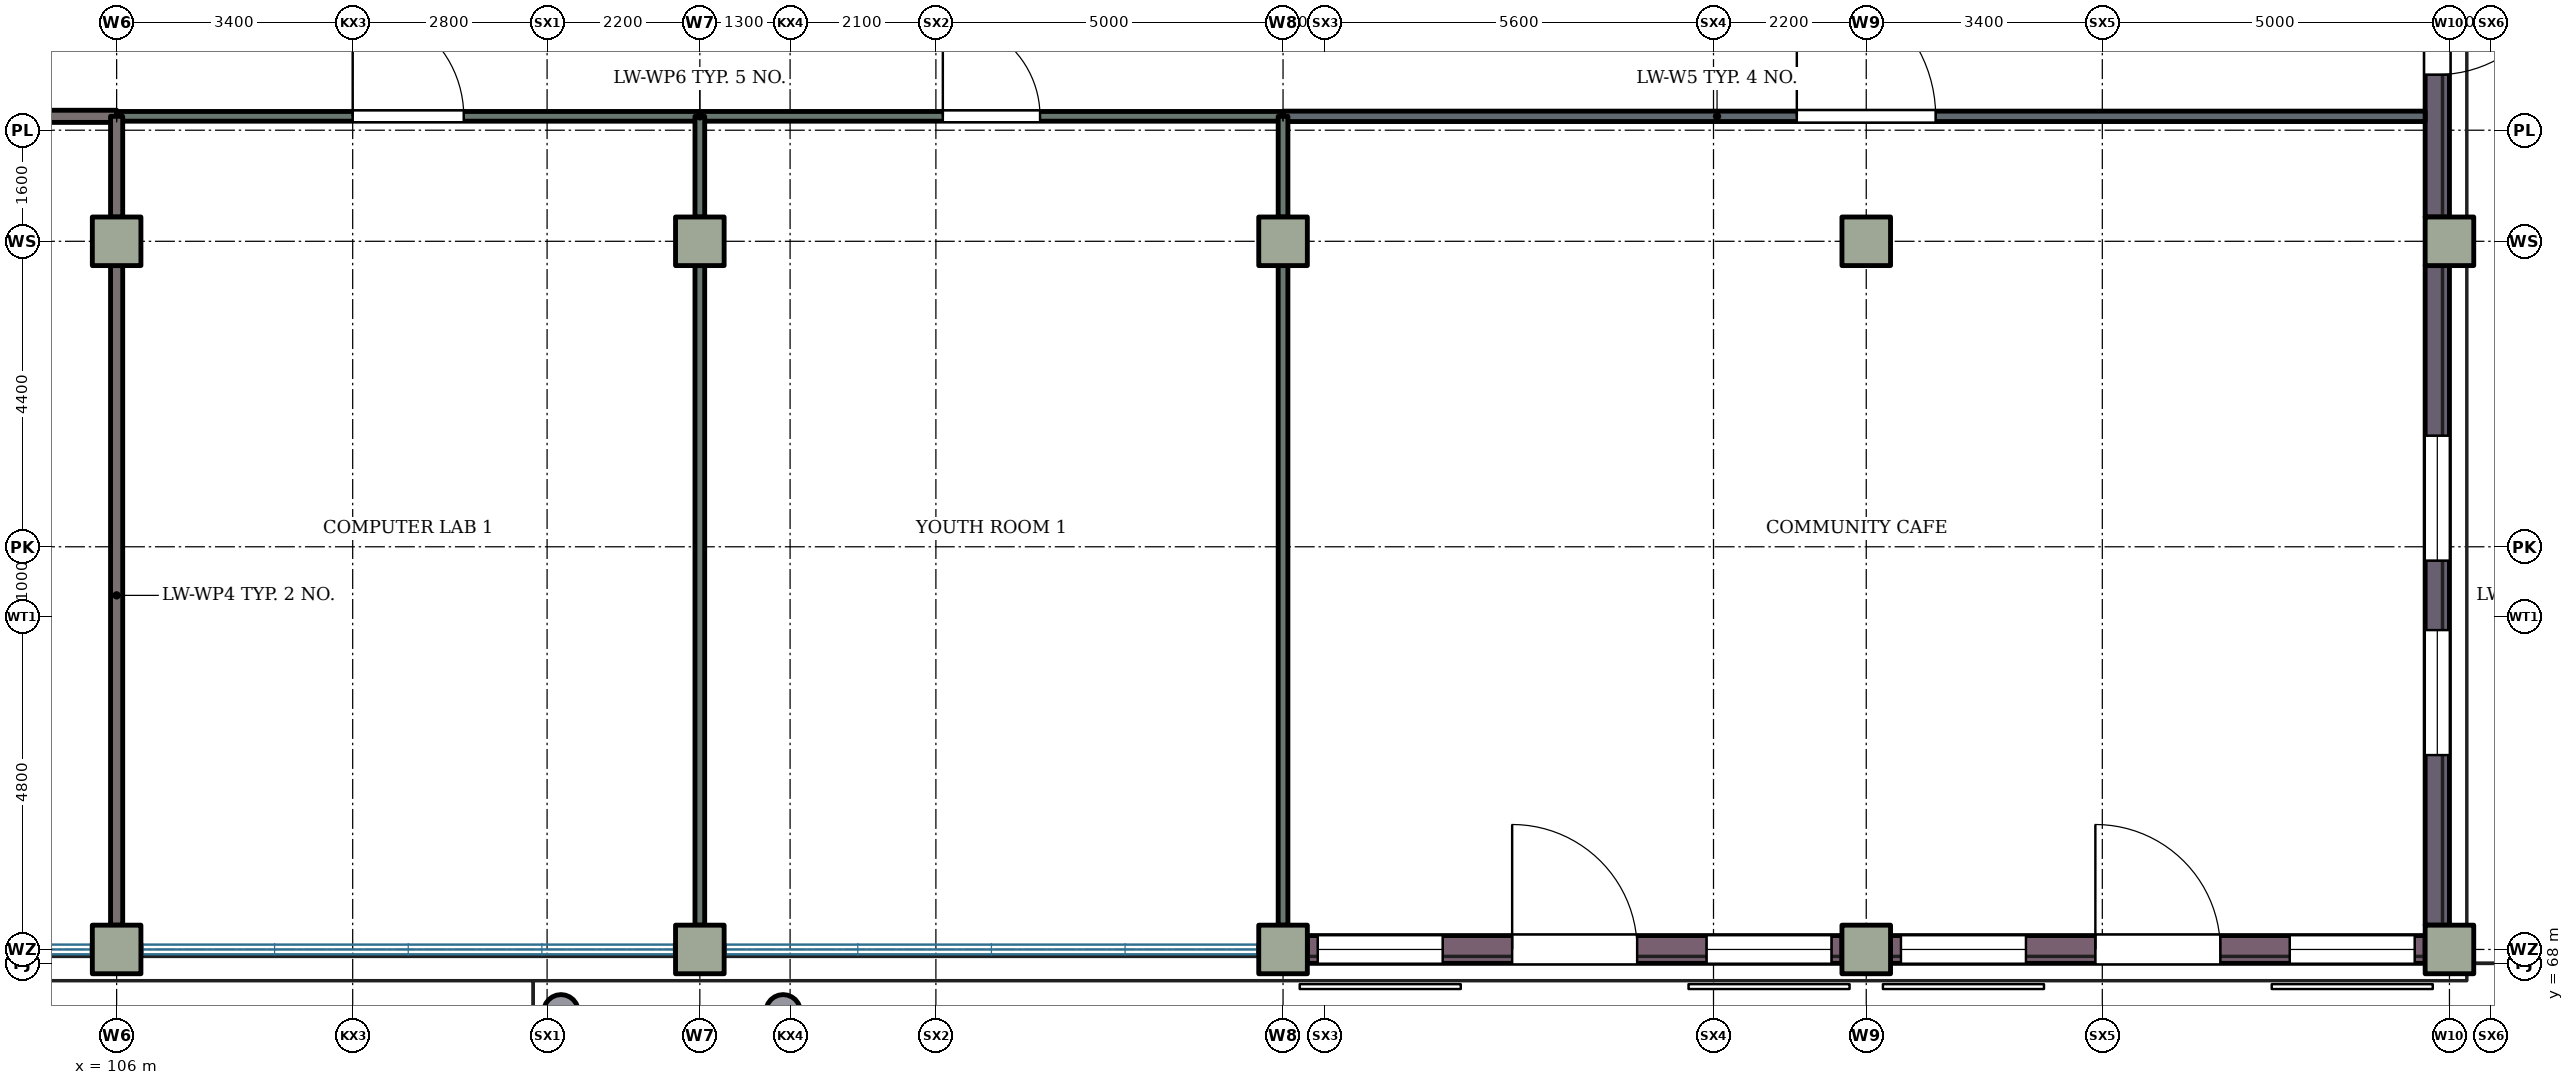
"""IFC4 building model, lengths in metres.
Left out: names, types, materials, properties, quantities, classifications, styles, units other than length and angle.
Written with IfcOpenShell. Run it as: python <this file> out.ifc"""

import sys

from ifc_helpers import new_model, si_unit, direction, frame, frame_2d, origin, origin_2d, place, context, subcontext, project, spatial, rectangle, circle, extrude, element, fill, save


model = new_model("IFC4")
c1 = context("Model", 3, precision=1e-05, world=origin(), true_north=direction((0.0, 1.0)))
c2 = subcontext(c1, "Body", "Model", "MODEL_VIEW")
j1 = project(units=[si_unit("LENGTHUNIT", "METRE"), si_unit("PLANEANGLEUNIT", "RADIAN")], contexts=[c1])
p1 = place(None, origin())
s1 = spatial("IfcSite", under=j1, at=p1, CompositionType="ELEMENT")
p2 = place(p1, origin())
s2 = spatial("IfcBuilding", under=s1, at=p2, CompositionType="ELEMENT")
p3 = place(p2, origin())
s3 = spatial("IfcBuildingStorey", under=s2, at=p3, CompositionType="ELEMENT", Elevation=0.0)
for number, where, z_axis, x_axis in (
    (1, (106.0, 78.4, 0.0), (0.0, 0.0, 1.0), (1.0, 0.0, 0.0)),
    (2, (114.4, 78.4, 0.0), (0.0, 0.0, 1.0), (1.0, 0.0, 0.0)),
    (3, (122.8, 78.4, 0.0), (0.0, 0.0, 1.0), (1.0, 0.0, 0.0)),
    (4, (131.2, 78.4, 0.0), (0.0, 0.0, 1.0), (1.0, 0.0, 0.0)),
    (5, (139.6, 78.4, 0.0), (0.0, 0.0, 1.0), (1.0, 0.0, 0.0)),
    (6, (106.0, 68.2, 0.0), (0.0, 0.0, 1.0), (1.0, 0.0, 0.0)),
    (7, (114.4, 68.2, 0.0), (0.0, 0.0, 1.0), (1.0, 0.0, 0.0)),
    (8, (122.8, 68.2, 0.0), (0.0, 0.0, 1.0), (1.0, 0.0, 0.0)),
    (9, (131.2, 68.2, 0.0), (0.0, 0.0, 1.0), (1.0, 0.0, 0.0)),
    (10, (139.6, 68.2, 0.0), (0.0, 0.0, 1.0), (1.0, 0.0, 0.0)),
):
    element("IfcColumn", number, at=place(p3, frame(where, z_axis=z_axis, x_axis=x_axis)), inside=s3, PredefinedType="COLUMN", context=c2, shape_type="SweptSolid", body=[
        extrude(rectangle(XDim=0.7, YDim=0.7, at=origin_2d()), origin(), (0.0, 0.0, 1.0), 4.2),
    ])
p4 = place(p3, frame((139.425, 78.05, 0.0), z_axis=(0.0, 0.0, 1.0), x_axis=(0.0, -1.0, 0.0)))
e11 = element("IfcWall", 11, at=p4, inside=s3, PredefinedType="SHEAR", context=c2, shape_type="SweptSolid", body=[
    extrude(rectangle(XDim=9.5, YDim=0.35, at=frame_2d((4.75, 0.0))), origin(), (0.0, 0.0, 1.0), 4.2),
])
p5 = place(p4, frame((5.25, 0.0, 0.9)))
e12 = element("IfcOpeningElement", 12, at=p5, cuts=e11, PredefinedType="OPENING", context=c2, shape_type="SweptSolid", body=[
    extrude(rectangle(XDim=1.8, YDim=2.1, at=frame_2d((0.9, 1.05))), frame((0.0, 0.185, 0.0), z_axis=(0.0, -1.0, 0.0), x_axis=(1.0, 0.0, 0.0)), (0.0, 0.0, 1.0), 0.37),
])
p6 = place(p4, frame((2.45, 0.0, 0.9)))
e13 = element("IfcOpeningElement", 13, at=p6, cuts=e11, PredefinedType="OPENING", context=c2, shape_type="SweptSolid", body=[
    extrude(rectangle(XDim=1.8, YDim=2.1, at=frame_2d((0.9, 1.05))), frame((0.0, 0.185, 0.0), z_axis=(0.0, -1.0, 0.0), x_axis=(1.0, 0.0, 0.0)), (0.0, 0.0, 1.0), 0.37),
])
p7 = place(p3, frame((139.425, 87.25, 0.0), z_axis=(0.0, 0.0, 1.0), x_axis=(0.0, -1.0, 0.0)))
e14 = element("IfcWall", 14, at=p7, inside=s3, PredefinedType="SHEAR", context=c2, shape_type="SweptSolid", body=[
    extrude(rectangle(XDim=8.5, YDim=0.35, at=frame_2d((4.25, 0.0))), origin(), (0.0, 0.0, 1.0), 4.2),
])
p8 = place(p7, frame((4.65, 0.0, 0.0)))
e15 = element("IfcOpeningElement", 15, at=p8, cuts=e14, PredefinedType="OPENING", context=c2, shape_type="SweptSolid", body=[
    extrude(rectangle(XDim=1.8, YDim=2.1, at=frame_2d((0.9, 1.05))), frame((0.0, 0.185, 0.0), z_axis=(0.0, -1.0, 0.0), x_axis=(1.0, 0.0, 0.0)), (0.0, 0.0, 1.0), 0.37),
])
p9 = place(p7, frame((0.95, 0.0, 0.0)))
e16 = element("IfcOpeningElement", 16, at=p9, cuts=e14, PredefinedType="OPENING", context=c2, shape_type="SweptSolid", body=[
    extrude(rectangle(XDim=1.0, YDim=2.1, at=frame_2d((0.5, 1.05))), frame((0.0, 0.185, 0.0), z_axis=(0.0, -1.0, 0.0), x_axis=(1.0, 0.0, 0.0)), (0.0, 0.0, 1.0), 0.37),
])
for number, where, z_axis, x_axis in (
    (17, (112.4, 67.3, 0.0), (0.0, 0.0, 1.0), (1.0, 0.0, 0.0)),
    (18, (115.6, 67.3, 0.0), (0.0, 0.0, 1.0), (1.0, 0.0, 0.0)),
):
    element("IfcColumn", number, at=place(p3, frame(where, z_axis=z_axis, x_axis=x_axis)), inside=s3, PredefinedType="COLUMN", context=c2, shape_type="SweptSolid", body=[
        extrude(circle(Radius=0.25, at=origin_2d()), origin(), (0.0, 0.0, 1.0), 4.2),
    ])
p10 = place(p3, frame((123.15, 68.2, 0.0), z_axis=(0.0, 0.0, 1.0), x_axis=(1.0, 0.0, 0.0)))
e19 = element("IfcWall", 19, at=p10, inside=s3, PredefinedType="SOLIDWALL", context=c2, shape_type="SweptSolid", body=[
    extrude(rectangle(XDim=7.7, YDim=0.4, at=frame_2d((3.85, 0.0))), origin(), (0.0, 0.0, 1.0), 3.32),
])
p11 = place(p10, frame((2.95, 0.0, 0.0)))
e20 = element("IfcOpeningElement", 20, at=p11, cuts=e19, PredefinedType="OPENING", context=c2, shape_type="SweptSolid", body=[
    extrude(rectangle(XDim=1.8, YDim=2.4, at=frame_2d((0.9, 1.2))), frame((0.0, 0.21, 0.0), z_axis=(0.0, -1.0, 0.0), x_axis=(1.0, 0.0, 0.0)), (0.0, 0.0, 1.0), 0.42),
])
p12 = place(p10, frame((0.15, 0.0, 0.9)))
e21 = element("IfcOpeningElement", 21, at=p12, cuts=e19, PredefinedType="OPENING", context=c2, shape_type="SweptSolid", body=[
    extrude(rectangle(XDim=1.8, YDim=1.9, at=frame_2d((0.9, 0.95))), frame((0.0, 0.21, 0.0), z_axis=(0.0, -1.0, 0.0), x_axis=(1.0, 0.0, 0.0)), (0.0, 0.0, 1.0), 0.42),
])
p13 = place(p10, frame((5.75, 0.0, 0.9)))
e22 = element("IfcOpeningElement", 22, at=p13, cuts=e19, PredefinedType="OPENING", context=c2, shape_type="SweptSolid", body=[
    extrude(rectangle(XDim=1.8, YDim=1.9, at=frame_2d((0.9, 0.95))), frame((0.0, 0.21, 0.0), z_axis=(0.0, -1.0, 0.0), x_axis=(1.0, 0.0, 0.0)), (0.0, 0.0, 1.0), 0.42),
])
p14 = place(p3, frame((131.55, 68.2, 0.0), z_axis=(0.0, 0.0, 1.0), x_axis=(1.0, 0.0, 0.0)))
e23 = element("IfcWall", 23, at=p14, inside=s3, PredefinedType="SOLIDWALL", context=c2, shape_type="SweptSolid", body=[
    extrude(rectangle(XDim=7.7, YDim=0.4, at=frame_2d((3.85, 0.0))), origin(), (0.0, 0.0, 1.0), 3.32),
])
p15 = place(p14, frame((2.95, 0.0, 0.0)))
e24 = element("IfcOpeningElement", 24, at=p15, cuts=e23, PredefinedType="OPENING", context=c2, shape_type="SweptSolid", body=[
    extrude(rectangle(XDim=1.8, YDim=2.4, at=frame_2d((0.9, 1.2))), frame((0.0, 0.21, 0.0), z_axis=(0.0, -1.0, 0.0), x_axis=(1.0, 0.0, 0.0)), (0.0, 0.0, 1.0), 0.42),
])
p16 = place(p14, frame((0.15, 0.0, 0.9)))
e25 = element("IfcOpeningElement", 25, at=p16, cuts=e23, PredefinedType="OPENING", context=c2, shape_type="SweptSolid", body=[
    extrude(rectangle(XDim=1.8, YDim=1.9, at=frame_2d((0.9, 0.95))), frame((0.0, 0.21, 0.0), z_axis=(0.0, -1.0, 0.0), x_axis=(1.0, 0.0, 0.0)), (0.0, 0.0, 1.0), 0.42),
])
p17 = place(p14, frame((5.75, 0.0, 0.9)))
e26 = element("IfcOpeningElement", 26, at=p17, cuts=e23, PredefinedType="OPENING", context=c2, shape_type="SweptSolid", body=[
    extrude(rectangle(XDim=1.8, YDim=1.9, at=frame_2d((0.9, 0.95))), frame((0.0, 0.21, 0.0), z_axis=(0.0, -1.0, 0.0), x_axis=(1.0, 0.0, 0.0)), (0.0, 0.0, 1.0), 0.42),
])
p18 = place(p3, frame((80.8, 80.2, 0.0), z_axis=(0.0, 0.0, 1.0), x_axis=(1.0, 0.0, 0.0)))
e27 = element("IfcWall", 27, at=p18, inside=s3, PredefinedType="PARTITIONING", context=c2, shape_type="SweptSolid", body=[
    extrude(rectangle(XDim=25.2, YDim=0.175, at=frame_2d((12.6, 0.0))), origin(), (0.0, 0.0, 1.0), 3.92),
])
p19 = place(p18, frame((11.9, 0.0, 0.0)))
e28 = element("IfcOpeningElement", 28, at=p19, cuts=e27, PredefinedType="OPENING", context=c2, shape_type="SweptSolid", body=[
    extrude(rectangle(XDim=1.4, YDim=2.1, at=frame_2d((0.7, 1.05))), frame((0.0, 0.097, 0.0), z_axis=(0.0, -1.0, 0.0), x_axis=(1.0, 0.0, 0.0)), (0.0, 0.0, 1.0), 0.195),
])
p20 = place(p3, frame((122.8, 80.2, 0.0), z_axis=(0.0, 0.0, 1.0), x_axis=(1.0, 0.0, 0.0)))
e29 = element("IfcWall", 29, at=p20, inside=s3, PredefinedType="PARTITIONING", context=c2, shape_type="SweptSolid", body=[
    extrude(rectangle(XDim=16.45, YDim=0.15, at=frame_2d((8.225, 0.0))), origin(), (0.0, 0.0, 1.0), 3.92),
])
p21 = place(p20, frame((7.4, 0.0, 0.0)))
e30 = element("IfcOpeningElement", 30, at=p21, cuts=e29, PredefinedType="OPENING", context=c2, shape_type="SweptSolid", body=[
    extrude(rectangle(XDim=2.0, YDim=2.1, at=frame_2d((1.0, 1.05))), frame((0.0, 0.085, 0.0), z_axis=(0.0, -1.0, 0.0), x_axis=(1.0, 0.0, 0.0)), (0.0, 0.0, 1.0), 0.17),
])
p22 = place(p3, frame((106.0, 80.2, 0.0), z_axis=(0.0, 0.0, 1.0), x_axis=(1.0, 0.0, 0.0)))
e31 = element("IfcWall", 31, at=p22, inside=s3, PredefinedType="PARTITIONING", context=c2, shape_type="SweptSolid", body=[
    extrude(rectangle(XDim=16.8, YDim=0.14, at=frame_2d((8.4, 0.0))), origin(), (0.0, 0.0, 1.0), 3.92),
])
p23 = place(p22, frame((3.4, 0.0, 0.0)))
e32 = element("IfcOpeningElement", 32, at=p23, cuts=e31, PredefinedType="OPENING", context=c2, shape_type="SweptSolid", body=[
    extrude(rectangle(XDim=1.6, YDim=2.1, at=frame_2d((0.8, 1.05))), frame((0.0, 0.08, 0.0), z_axis=(0.0, -1.0, 0.0), x_axis=(1.0, 0.0, 0.0)), (0.0, 0.0, 1.0), 0.16),
])
p24 = place(p22, frame((11.9, 0.0, 0.0)))
e33 = element("IfcOpeningElement", 33, at=p24, cuts=e31, PredefinedType="OPENING", context=c2, shape_type="SweptSolid", body=[
    extrude(rectangle(XDim=1.4, YDim=2.1, at=frame_2d((0.7, 1.05))), frame((0.0, 0.08, 0.0), z_axis=(0.0, -1.0, 0.0), x_axis=(1.0, 0.0, 0.0)), (0.0, 0.0, 1.0), 0.16),
])
p25 = place(p3, frame((106.0, 68.55, 0.0), z_axis=(0.0, 0.0, 1.0), x_axis=(0.0, 1.0, 0.0)))
e34 = element("IfcWall", 34, at=p25, inside=s3, PredefinedType="PARTITIONING", context=c2, shape_type="SweptSolid", body=[
    extrude(rectangle(XDim=9.5, YDim=0.175, at=frame_2d((4.75, 0.0))), origin(), (0.0, 0.0, 1.0), 3.02),
])
p26 = place(p3, frame((106.0, 78.75, 0.0), z_axis=(0.0, 0.0, 1.0), x_axis=(0.0, 1.0, 0.0)))
e35 = element("IfcWall", 35, at=p26, inside=s3, PredefinedType="PARTITIONING", context=c2, shape_type="SweptSolid", body=[
    extrude(rectangle(XDim=1.45, YDim=0.175, at=frame_2d((0.725, 0.0))), origin(), (0.0, 0.0, 1.0), 3.02),
])
p27 = place(p3, frame((114.4, 68.55, 0.0), z_axis=(0.0, 0.0, 1.0), x_axis=(0.0, 1.0, 0.0)))
e36 = element("IfcWall", 36, at=p27, inside=s3, PredefinedType="PARTITIONING", context=c2, shape_type="SweptSolid", body=[
    extrude(rectangle(XDim=9.5, YDim=0.14, at=frame_2d((4.75, 0.0))), origin(), (0.0, 0.0, 1.0), 3.02),
])
p28 = place(p3, frame((114.4, 78.75, 0.0), z_axis=(0.0, 0.0, 1.0), x_axis=(0.0, 1.0, 0.0)))
e37 = element("IfcWall", 37, at=p28, inside=s3, PredefinedType="PARTITIONING", context=c2, shape_type="SweptSolid", body=[
    extrude(rectangle(XDim=1.45, YDim=0.14, at=frame_2d((0.725, 0.0))), origin(), (0.0, 0.0, 1.0), 3.02),
])
p29 = place(p3, frame((122.8, 68.55, 0.0), z_axis=(0.0, 0.0, 1.0), x_axis=(0.0, 1.0, 0.0)))
e38 = element("IfcWall", 38, at=p29, inside=s3, PredefinedType="PARTITIONING", context=c2, shape_type="SweptSolid", body=[
    extrude(rectangle(XDim=9.5, YDim=0.14, at=frame_2d((4.75, 0.0))), origin(), (0.0, 0.0, 1.0), 3.02),
])
p30 = place(p3, frame((122.8, 78.75, 0.0), z_axis=(0.0, 0.0, 1.0), x_axis=(0.0, 1.0, 0.0)))
e39 = element("IfcWall", 39, at=p30, inside=s3, PredefinedType="PARTITIONING", context=c2, shape_type="SweptSolid", body=[
    extrude(rectangle(XDim=1.45, YDim=0.14, at=frame_2d((0.725, 0.0))), origin(), (0.0, 0.0, 1.0), 3.02),
])
p31 = place(p11, origin())
e40 = element("IfcDoor", 40, at=p31, inside=s3, OperationType="DOUBLE_DOOR_SINGLE_SWING", PredefinedType="DOOR", context=c2, shape_type="SweptSolid", body=[
    extrude(rectangle(XDim=1.8, YDim=2.4, at=frame_2d((0.9, 1.2))), frame((0.0, 0.025, 0.0), z_axis=(0.0, -1.0, 0.0), x_axis=(1.0, 0.0, 0.0)), (0.0, 0.0, 1.0), 0.05),
])
fill(e20, e40)
p32 = place(p12, origin())
e41 = element("IfcWindow", 41, at=p32, inside=s3, PartitioningType="SINGLE_PANEL", PredefinedType="WINDOW", context=c2, shape_type="SweptSolid", body=[
    extrude(rectangle(XDim=1.8, YDim=1.9, at=frame_2d((0.9, 0.95))), frame((0.0, 0.03, 0.0), z_axis=(0.0, -1.0, 0.0), x_axis=(1.0, 0.0, 0.0)), (0.0, 0.0, 1.0), 0.06),
])
fill(e21, e41)
p33 = place(p13, origin())
e42 = element("IfcWindow", 42, at=p33, inside=s3, PartitioningType="SINGLE_PANEL", PredefinedType="WINDOW", context=c2, shape_type="SweptSolid", body=[
    extrude(rectangle(XDim=1.8, YDim=1.9, at=frame_2d((0.9, 0.95))), frame((0.0, 0.03, 0.0), z_axis=(0.0, -1.0, 0.0), x_axis=(1.0, 0.0, 0.0)), (0.0, 0.0, 1.0), 0.06),
])
fill(e22, e42)
p34 = place(p15, origin())
e43 = element("IfcDoor", 43, at=p34, inside=s3, OperationType="DOUBLE_DOOR_SINGLE_SWING", PredefinedType="DOOR", context=c2, shape_type="SweptSolid", body=[
    extrude(rectangle(XDim=1.8, YDim=2.4, at=frame_2d((0.9, 1.2))), frame((0.0, 0.025, 0.0), z_axis=(0.0, -1.0, 0.0), x_axis=(1.0, 0.0, 0.0)), (0.0, 0.0, 1.0), 0.05),
])
fill(e24, e43)
p35 = place(p16, origin())
e44 = element("IfcWindow", 44, at=p35, inside=s3, PartitioningType="SINGLE_PANEL", PredefinedType="WINDOW", context=c2, shape_type="SweptSolid", body=[
    extrude(rectangle(XDim=1.8, YDim=1.9, at=frame_2d((0.9, 0.95))), frame((0.0, 0.03, 0.0), z_axis=(0.0, -1.0, 0.0), x_axis=(1.0, 0.0, 0.0)), (0.0, 0.0, 1.0), 0.06),
])
fill(e25, e44)
p36 = place(p17, origin())
e45 = element("IfcWindow", 45, at=p36, inside=s3, PartitioningType="SINGLE_PANEL", PredefinedType="WINDOW", context=c2, shape_type="SweptSolid", body=[
    extrude(rectangle(XDim=1.8, YDim=1.9, at=frame_2d((0.9, 0.95))), frame((0.0, 0.03, 0.0), z_axis=(0.0, -1.0, 0.0), x_axis=(1.0, 0.0, 0.0)), (0.0, 0.0, 1.0), 0.06),
])
fill(e26, e45)
p37 = place(p8, origin())
e46 = element("IfcDoor", 46, at=p37, inside=s3, OperationType="DOUBLE_DOOR_SINGLE_SWING", PredefinedType="DOOR", context=c2, shape_type="SweptSolid", body=[
    extrude(rectangle(XDim=1.8, YDim=2.1, at=frame_2d((0.9, 1.05))), frame((0.0, 0.025, 0.0), z_axis=(0.0, -1.0, 0.0), x_axis=(1.0, 0.0, 0.0)), (0.0, 0.0, 1.0), 0.05),
])
fill(e15, e46)
p38 = place(p5, origin())
e47 = element("IfcWindow", 47, at=p38, inside=s3, PartitioningType="SINGLE_PANEL", PredefinedType="WINDOW", context=c2, shape_type="SweptSolid", body=[
    extrude(rectangle(XDim=1.8, YDim=2.1, at=frame_2d((0.9, 1.05))), frame((0.0, 0.03, 0.0), z_axis=(0.0, -1.0, 0.0), x_axis=(1.0, 0.0, 0.0)), (0.0, 0.0, 1.0), 0.06),
])
fill(e12, e47)
p39 = place(p6, origin())
e48 = element("IfcWindow", 48, at=p39, inside=s3, PartitioningType="SINGLE_PANEL", PredefinedType="WINDOW", context=c2, shape_type="SweptSolid", body=[
    extrude(rectangle(XDim=1.8, YDim=2.1, at=frame_2d((0.9, 1.05))), frame((0.0, 0.03, 0.0), z_axis=(0.0, -1.0, 0.0), x_axis=(1.0, 0.0, 0.0)), (0.0, 0.0, 1.0), 0.06),
])
fill(e13, e48)
p40 = place(p23, origin())
e49 = element("IfcDoor", 49, at=p40, inside=s3, OperationType="DOUBLE_DOOR_SINGLE_SWING", PredefinedType="DOOR", context=c2, shape_type="SweptSolid", body=[
    extrude(rectangle(XDim=1.6, YDim=2.1, at=frame_2d((0.8, 1.05))), frame((0.0, 0.025, 0.0), z_axis=(0.0, -1.0, 0.0), x_axis=(1.0, 0.0, 0.0)), (0.0, 0.0, 1.0), 0.05),
])
fill(e32, e49)
p41 = place(p24, origin())
e50 = element("IfcDoor", 50, at=p41, inside=s3, OperationType="DOUBLE_DOOR_SINGLE_SWING", PredefinedType="DOOR", context=c2, shape_type="SweptSolid", body=[
    extrude(rectangle(XDim=1.4, YDim=2.1, at=frame_2d((0.7, 1.05))), frame((0.0, 0.025, 0.0), z_axis=(0.0, -1.0, 0.0), x_axis=(1.0, 0.0, 0.0)), (0.0, 0.0, 1.0), 0.05),
])
fill(e33, e50)
p42 = place(p21, origin())
e51 = element("IfcDoor", 51, at=p42, inside=s3, OperationType="DOUBLE_DOOR_SINGLE_SWING", PredefinedType="DOOR", context=c2, shape_type="SweptSolid", body=[
    extrude(rectangle(XDim=2.0, YDim=2.1, at=frame_2d((1.0, 1.05))), frame((0.0, 0.025, 0.0), z_axis=(0.0, -1.0, 0.0), x_axis=(1.0, 0.0, 0.0)), (0.0, 0.0, 1.0), 0.05),
])
fill(e30, e51)
save(model, sys.argv[1])
